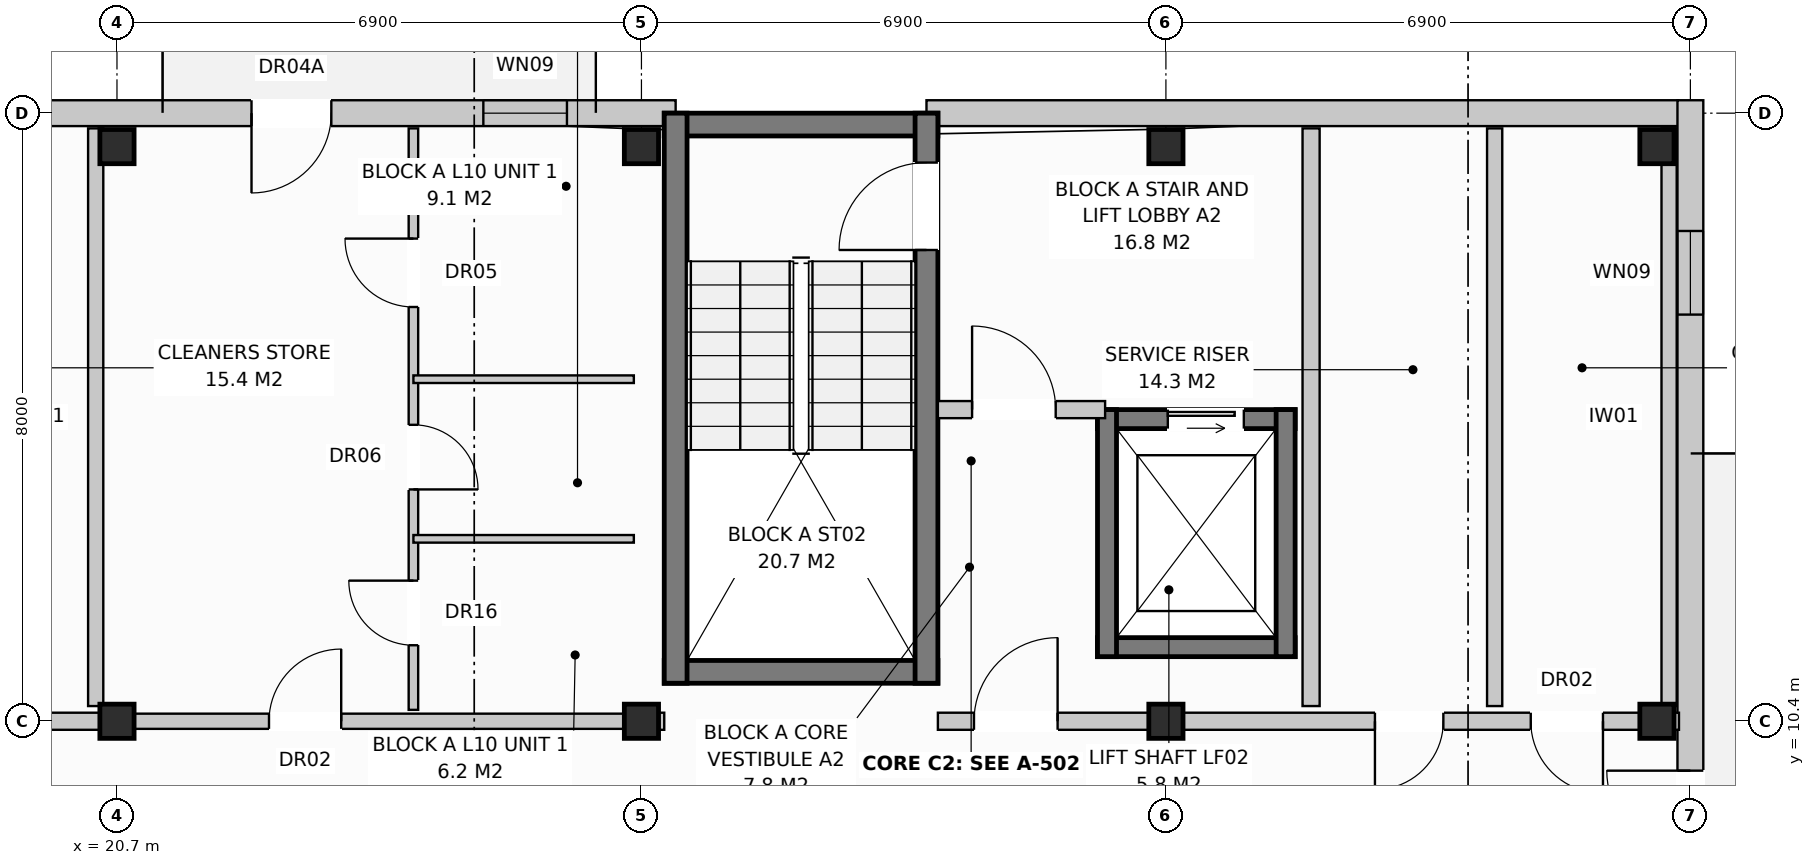
"""IFC4 building model, lengths in metres.
Left out: names, types, materials, properties, quantities, classifications, styles, units other than length and angle.
Written with IfcOpenShell. Run it as: python <this file> out.ifc"""

import sys

from ifc_helpers import new_model, si_unit, direction, frame, frame_2d, origin, origin_with_axes, origin_2d, place, context, subcontext, project, spatial, rectangle, extrude, element, fill, save


model = new_model("IFC4")
c1 = context("Model", 3, precision=1e-05, world=origin(), true_north=direction((0.0, 1.0)))
c2 = subcontext(c1, "Body", "Model", "MODEL_VIEW")
j1 = project(units=[si_unit("LENGTHUNIT", "METRE"), si_unit("PLANEANGLEUNIT", "RADIAN")], contexts=[c1])
p1 = place(None, origin())
s1 = spatial("IfcSite", under=j1, at=p1, CompositionType="ELEMENT")
p2 = place(p1, origin())
s2 = spatial("IfcBuilding", under=s1, at=p2, CompositionType="ELEMENT")
p3 = place(p2, frame((0.0, 0.0, 33.6)))
s3 = spatial("IfcBuildingStorey", under=s2, at=p3, CompositionType="ELEMENT", Elevation=33.6)
for number, where, z_axis, x_axis in (
    (1, (20.7, 10.4, 0.0), (0.0, 0.0, 1.0), (1.0, 0.0, 0.0)),
    (2, (20.7, 17.96, 0.0), (0.0, 0.0, 1.0), (1.0, 0.0, 0.0)),
    (3, (27.6, 10.4, 0.0), (0.0, 0.0, 1.0), (1.0, 0.0, 0.0)),
    (4, (27.6, 17.96, 0.0), (0.0, 0.0, 1.0), (1.0, 0.0, 0.0)),
    (5, (34.5, 10.4, 0.0), (0.0, 0.0, 1.0), (1.0, 0.0, 0.0)),
    (6, (34.5, 17.96, 0.0), (0.0, 0.0, 1.0), (1.0, 0.0, 0.0)),
    (7, (40.96, 10.4, 0.0), (0.0, 0.0, 1.0), (1.0, 0.0, 0.0)),
    (8, (40.96, 17.96, 0.0), (0.0, 0.0, 1.0), (1.0, 0.0, 0.0)),
):
    element("IfcColumn", number, at=place(p3, frame(where, z_axis=z_axis, x_axis=x_axis)), inside=s3, PredefinedType="COLUMN", context=c2, shape_type="SweptSolid", body=[
        extrude(rectangle(XDim=0.45, YDim=0.45, at=origin_2d()), origin(), (0.0, 0.0, 1.0), 3.2),
    ])
p4 = place(p3, frame((10.65, 18.4, 0.0), z_axis=(0.0, 0.0, 1.0), x_axis=(1.0, 0.0, 0.0)))
e9 = element("IfcWall", 9, at=p4, inside=s3, PredefinedType="STANDARD", context=c2, shape_type="SweptSolid", body=[
    extrude(rectangle(XDim=17.4, YDim=0.34, at=frame_2d((8.7, 0.0))), origin(), (0.0, 0.0, 1.0), 2.96),
])
p5 = place(p4, frame((11.82, 0.0, 0.0)))
e10 = element("IfcOpeningElement", 10, at=p5, cuts=e9, PredefinedType="OPENING", context=c2, shape_type="SweptSolid", body=[
    extrude(rectangle(XDim=1.05, YDim=2.12, at=frame_2d((0.525, 1.06))), frame((0.0, 0.182, 0.0), z_axis=(0.0, -1.0, 0.0), x_axis=(1.0, 0.0, 0.0)), (0.0, 0.0, 1.0), 0.364),
])
p6 = place(p4, frame((14.87, 0.0, 0.72)))
e11 = element("IfcOpeningElement", 11, at=p6, cuts=e9, PredefinedType="OPENING", context=c2, shape_type="SweptSolid", body=[
    extrude(rectangle(XDim=1.1, YDim=1.5, at=frame_2d((0.55, 0.75))), frame((0.0, 0.182, 0.0), z_axis=(0.0, -1.0, 0.0), x_axis=(1.0, 0.0, 0.0)), (0.0, 0.0, 1.0), 0.364),
])
p7 = place(p3, frame((31.35, 18.4, 0.0), z_axis=(0.0, 0.0, 1.0), x_axis=(1.0, 0.0, 0.0)))
e12 = element("IfcWall", 12, at=p7, inside=s3, PredefinedType="STANDARD", context=c2, shape_type="SweptSolid", body=[
    extrude(rectangle(XDim=9.89, YDim=0.34, at=frame_2d((4.945, 0.0))), origin(), (0.0, 0.0, 1.0), 2.96),
])
p8 = place(p3, frame((41.4, -0.17, 0.0), z_axis=(0.0, 0.0, 1.0), x_axis=(0.0, 1.0, 0.0)))
e13 = element("IfcWall", 13, at=p8, inside=s3, PredefinedType="STANDARD", context=c2, shape_type="SweptSolid", body=[
    extrude(rectangle(XDim=18.74, YDim=0.34, at=frame_2d((9.37, 0.0))), origin(), (0.0, 0.0, 1.0), 2.96),
])
p9 = place(p8, frame((8.82, 0.0, 0.0)))
e14 = element("IfcOpeningElement", 14, at=p9, cuts=e13, PredefinedType="OPENING", context=c2, shape_type="SweptSolid", body=[
    extrude(rectangle(XDim=1.1, YDim=2.1, at=frame_2d((0.55, 1.05))), frame((0.0, 0.182, 0.0), z_axis=(0.0, -1.0, 0.0), x_axis=(1.0, 0.0, 0.0)), (0.0, 0.0, 1.0), 0.364),
])
p10 = place(p8, frame((1.72, 0.0, 0.72)))
e15 = element("IfcOpeningElement", 15, at=p10, cuts=e13, PredefinedType="OPENING", context=c2, shape_type="SweptSolid", body=[
    extrude(rectangle(XDim=1.1, YDim=1.5, at=frame_2d((0.55, 0.75))), frame((0.0, 0.182, 0.0), z_axis=(0.0, -1.0, 0.0), x_axis=(1.0, 0.0, 0.0)), (0.0, 0.0, 1.0), 0.364),
])
p11 = place(p8, frame((15.92, 0.0, 0.72)))
e16 = element("IfcOpeningElement", 16, at=p11, cuts=e13, PredefinedType="OPENING", context=c2, shape_type="SweptSolid", body=[
    extrude(rectangle(XDim=1.1, YDim=1.5, at=frame_2d((0.55, 0.75))), frame((0.0, 0.182, 0.0), z_axis=(0.0, -1.0, 0.0), x_axis=(1.0, 0.0, 0.0)), (0.0, 0.0, 1.0), 0.364),
])
p12 = place(p3, frame((20.42, 10.6, 0.0), z_axis=(0.0, 0.0, 1.0), x_axis=(0.0, 1.0, 0.0)))
e17 = element("IfcWall", 17, at=p12, inside=s3, PredefinedType="PARTITIONING", context=c2, shape_type="SweptSolid", body=[
    extrude(rectangle(XDim=7.6, YDim=0.2, at=frame_2d((3.8, 0.0))), origin(), (0.0, 0.0, 1.0), 2.96),
])
p13 = place(p3, frame((10.8, 10.4, 0.0), z_axis=(0.0, 0.0, 1.0), x_axis=(1.0, 0.0, 0.0)))
e18 = element("IfcWall", 18, at=p13, inside=s3, PredefinedType="PARTITIONING", context=c2, shape_type="SweptSolid", body=[
    extrude(rectangle(XDim=9.9, YDim=0.225, at=frame_2d((4.95, 0.0))), origin(), (0.0, 0.0, 1.0), 2.4),
])
p14 = place(p13, frame((0.475, 0.0, 0.0)))
e19 = element("IfcOpeningElement", 19, at=p14, cuts=e18, PredefinedType="OPENING", context=c2, shape_type="SweptSolid", body=[
    extrude(rectangle(XDim=1.1, YDim=2.15, at=frame_2d((0.55, 1.075))), frame((0.0, 0.125, 0.0), z_axis=(0.0, -1.0, 0.0), x_axis=(1.0, 0.0, 0.0)), (0.0, 0.0, 1.0), 0.249),
])
p15 = place(p13, frame((5.75, 0.0, 0.0)))
e20 = element("IfcOpeningElement", 20, at=p15, cuts=e18, PredefinedType="OPENING", context=c2, shape_type="SweptSolid", body=[
    extrude(rectangle(XDim=0.9, YDim=2.1, at=frame_2d((0.45, 1.05))), frame((0.0, 0.125, 0.0), z_axis=(0.0, -1.0, 0.0), x_axis=(1.0, 0.0, 0.0)), (0.0, 0.0, 1.0), 0.249),
])
p16 = place(p13, frame((7.8, 0.0, 0.0)))
e21 = element("IfcOpeningElement", 21, at=p16, cuts=e18, PredefinedType="OPENING", context=c2, shape_type="SweptSolid", body=[
    extrude(rectangle(XDim=0.95, YDim=2.15, at=frame_2d((0.475, 1.075))), frame((0.0, 0.125, 0.0), z_axis=(0.0, -1.0, 0.0), x_axis=(1.0, 0.0, 0.0)), (0.0, 0.0, 1.0), 0.249),
])
for number, where, z_axis, x_axis in (
    (22, (27.9, 18.25, 0.0), (0.0, 0.0, 1.0), (1.0, 0.0, 0.0)),
    (23, (27.9, 11.05, 0.0), (0.0, 0.0, 1.0), (1.0, 0.0, 0.0)),
):
    element("IfcWall", number, at=place(p3, frame(where, z_axis=z_axis, x_axis=x_axis)), inside=s3, PredefinedType="SHEAR", context=c2, shape_type="SweptSolid", body=[
        extrude(rectangle(XDim=3.6, YDim=0.3, at=frame_2d((1.8, 0.0))), origin(), (0.0, 0.0, 1.0), 2.96),
    ])
p17 = place(p3, frame((28.05, 10.9, 0.0), z_axis=(0.0, 0.0, 1.0), x_axis=(0.0, 1.0, 0.0)))
e24 = element("IfcWall", 24, at=p17, inside=s3, PredefinedType="SHEAR", context=c2, shape_type="SweptSolid", body=[
    extrude(rectangle(XDim=7.5, YDim=0.3, at=frame_2d((3.75, 0.0))), origin(), (0.0, 0.0, 1.0), 2.96),
])
p18 = place(p3, frame((31.35, 10.9, 0.0), z_axis=(0.0, 0.0, 1.0), x_axis=(0.0, 1.0, 0.0)))
e25 = element("IfcWall", 25, at=p18, inside=s3, PredefinedType="SHEAR", context=c2, shape_type="SweptSolid", body=[
    extrude(rectangle(XDim=7.5, YDim=0.3, at=frame_2d((3.75, 0.0))), origin(), (0.0, 0.0, 1.0), 2.96),
])
p19 = place(p18, frame((5.7, 0.0, 0.0)))
e26 = element("IfcOpeningElement", 26, at=p19, cuts=e25, PredefinedType="OPENING", context=c2, shape_type="SweptSolid", body=[
    extrude(rectangle(XDim=1.15, YDim=2.15, at=frame_2d((0.575, 1.075))), frame((0.0, 0.162, 0.0), z_axis=(0.0, -1.0, 0.0), x_axis=(1.0, 0.0, 0.0)), (0.0, 0.0, 1.0), 0.324),
])
p20 = place(p3, frame((33.6, 14.375, 0.0), z_axis=(0.0, 0.0, 1.0), x_axis=(1.0, 0.0, 0.0)))
e27 = element("IfcWall", 27, at=p20, inside=s3, PredefinedType="SHEAR", context=c2, shape_type="SweptSolid", body=[
    extrude(rectangle(XDim=2.6, YDim=0.25, at=frame_2d((1.3, 0.0))), origin(), (0.0, 0.0, 1.0), 2.96),
])
p21 = place(p20, frame((0.925, 0.0, 0.0)))
e28 = element("IfcOpeningElement", 28, at=p21, cuts=e27, PredefinedType="OPENING", context=c2, shape_type="SweptSolid", body=[
    extrude(rectangle(XDim=1.0, YDim=2.1, at=frame_2d((0.5, 1.05))), frame((0.0, 0.137, 0.0), z_axis=(0.0, -1.0, 0.0), x_axis=(1.0, 0.0, 0.0)), (0.0, 0.0, 1.0), 0.274),
])
p22 = place(p3, frame((33.6, 11.375, 0.0), z_axis=(0.0, 0.0, 1.0), x_axis=(1.0, 0.0, 0.0)))
e29 = element("IfcWall", 29, at=p22, inside=s3, PredefinedType="SHEAR", context=c2, shape_type="SweptSolid", body=[
    extrude(rectangle(XDim=2.6, YDim=0.25, at=frame_2d((1.3, 0.0))), origin(), (0.0, 0.0, 1.0), 2.96),
])
for number, where, z_axis, x_axis in (
    (30, (33.725, 11.25, 0.0), (0.0, 0.0, 1.0), (0.0, 1.0, 0.0)),
    (31, (36.075, 11.25, 0.0), (0.0, 0.0, 1.0), (0.0, 1.0, 0.0)),
):
    element("IfcWall", number, at=place(p3, frame(where, z_axis=z_axis, x_axis=x_axis)), inside=s3, PredefinedType="SHEAR", context=c2, shape_type="SweptSolid", body=[
        extrude(rectangle(XDim=3.25, YDim=0.25, at=frame_2d((1.625, 0.0))), origin(), (0.0, 0.0, 1.0), 2.96),
    ])
p23 = place(p3, frame((36.41, 10.6, 0.0), z_axis=(0.0, 0.0, 1.0), x_axis=(0.0, 1.0, 0.0)))
e32 = element("IfcWall", 32, at=p23, inside=s3, PredefinedType="PARTITIONING", context=c2, shape_type="SweptSolid", body=[
    extrude(rectangle(XDim=7.6, YDim=0.225, at=frame_2d((3.8, 0.0))), origin(), (0.0, 0.0, 1.0), 2.59),
])
p24 = place(p3, frame((31.5, 14.5, 0.0), z_axis=(0.0, 0.0, 1.0), x_axis=(1.0, 0.0, 0.0)))
e33 = element("IfcWall", 33, at=p24, inside=s3, PredefinedType="PARTITIONING", context=c2, shape_type="SweptSolid", body=[
    extrude(rectangle(XDim=2.2, YDim=0.225, at=frame_2d((1.1, 0.0))), origin(), (0.0, 0.0, 1.0), 2.96),
])
p25 = place(p24, frame((0.45, 0.0, 0.0)))
e34 = element("IfcOpeningElement", 34, at=p25, cuts=e33, PredefinedType="OPENING", context=c2, shape_type="SweptSolid", body=[
    extrude(rectangle(XDim=1.1, YDim=2.15, at=frame_2d((0.55, 1.075))), frame((0.0, 0.125, 0.0), z_axis=(0.0, -1.0, 0.0), x_axis=(1.0, 0.0, 0.0)), (0.0, 0.0, 1.0), 0.249),
])
p26 = place(p3, frame((27.6, 10.4, 0.0), z_axis=(0.0, 0.0, 1.0), x_axis=(1.0, 0.0, 0.0)))
e35 = element("IfcWall", 35, at=p26, inside=s3, PredefinedType="PARTITIONING", context=c2, shape_type="SweptSolid", body=[
    extrude(rectangle(XDim=0.3, YDim=0.225, at=frame_2d((0.15, 0.0))), origin(), (0.0, 0.0, 1.0), 2.96),
])
p27 = place(p3, frame((38.825, 10.6, 0.0), z_axis=(0.0, 0.0, 1.0), x_axis=(0.0, 1.0, 0.0)))
e36 = element("IfcWall", 36, at=p27, inside=s3, PredefinedType="PARTITIONING", context=c2, shape_type="SweptSolid", body=[
    extrude(rectangle(XDim=7.6, YDim=0.2, at=frame_2d((3.8, 0.0))), origin(), (0.0, 0.0, 1.0), 2.96),
])
p28 = place(p3, frame((41.12, 10.6, 0.0), z_axis=(0.0, 0.0, 1.0), x_axis=(0.0, 1.0, 0.0)))
e37 = element("IfcWall", 37, at=p28, inside=s3, PredefinedType="PARTITIONING", context=c2, shape_type="SweptSolid", body=[
    extrude(rectangle(XDim=7.6, YDim=0.2, at=frame_2d((3.8, 0.0))), origin(), (0.0, 0.0, 1.0), 2.4),
])
p29 = place(p3, frame((31.5, 10.4, 0.0), z_axis=(0.0, 0.0, 1.0), x_axis=(1.0, 0.0, 0.0)))
e38 = element("IfcWall", 38, at=p29, inside=s3, PredefinedType="PARTITIONING", context=c2, shape_type="SweptSolid", body=[
    extrude(rectangle(XDim=9.75, YDim=0.225, at=frame_2d((4.875, 0.0))), origin(), (0.0, 0.0, 1.0), 2.4),
])
p30 = place(p29, frame((0.475, 0.0, 0.0)))
e39 = element("IfcOpeningElement", 39, at=p30, cuts=e38, PredefinedType="OPENING", context=c2, shape_type="SweptSolid", body=[
    extrude(rectangle(XDim=1.1, YDim=2.15, at=frame_2d((0.55, 1.075))), frame((0.0, 0.125, 0.0), z_axis=(0.0, -1.0, 0.0), x_axis=(1.0, 0.0, 0.0)), (0.0, 0.0, 1.0), 0.249),
])
p31 = place(p29, frame((5.75, 0.0, 0.0)))
e40 = element("IfcOpeningElement", 40, at=p31, cuts=e38, PredefinedType="OPENING", context=c2, shape_type="SweptSolid", body=[
    extrude(rectangle(XDim=0.9, YDim=2.1, at=frame_2d((0.45, 1.05))), frame((0.0, 0.125, 0.0), z_axis=(0.0, -1.0, 0.0), x_axis=(1.0, 0.0, 0.0)), (0.0, 0.0, 1.0), 0.249),
])
p32 = place(p29, frame((7.8, 0.0, 0.0)))
e41 = element("IfcOpeningElement", 41, at=p32, cuts=e38, PredefinedType="OPENING", context=c2, shape_type="SweptSolid", body=[
    extrude(rectangle(XDim=0.95, YDim=2.15, at=frame_2d((0.475, 1.075))), frame((0.0, 0.125, 0.0), z_axis=(0.0, -1.0, 0.0), x_axis=(1.0, 0.0, 0.0)), (0.0, 0.0, 1.0), 0.249),
])
p33 = place(p3, frame((20.7, 10.4, 0.0), z_axis=(0.0, 0.0, 1.0), x_axis=(1.0, 0.0, 0.0)))
e42 = element("IfcWall", 42, at=p33, inside=s3, PredefinedType="PARTITIONING", context=c2, shape_type="SweptSolid", body=[
    extrude(rectangle(XDim=6.9, YDim=0.2, at=frame_2d((3.45, 0.0))), origin(), (0.0, 0.0, 1.0), 2.4),
])
p34 = place(p33, frame((2.0, 0.0, 0.0)))
e43 = element("IfcOpeningElement", 43, at=p34, cuts=e42, PredefinedType="OPENING", context=c2, shape_type="SweptSolid", body=[
    extrude(rectangle(XDim=0.95, YDim=2.15, at=frame_2d((0.475, 1.075))), frame((0.0, 0.112, 0.0), z_axis=(0.0, -1.0, 0.0), x_axis=(1.0, 0.0, 0.0)), (0.0, 0.0, 1.0), 0.224),
])
p35 = place(p3, frame((24.6, 10.55, 0.0), z_axis=(0.0, 0.0, 1.0), x_axis=(0.0, 1.0, 0.0)))
e44 = element("IfcWall", 44, at=p35, inside=s3, PredefinedType="PARTITIONING", context=c2, shape_type="SweptSolid", body=[
    extrude(rectangle(XDim=7.65, YDim=0.125, at=frame_2d((3.825, 0.0))), origin(), (0.0, 0.0, 1.0), 2.96),
])
p36 = place(p35, frame((0.85, 0.0, 0.0)))
e45 = element("IfcOpeningElement", 45, at=p36, cuts=e44, PredefinedType="OPENING", context=c2, shape_type="SweptSolid", body=[
    extrude(rectangle(XDim=0.85, YDim=2.1, at=frame_2d((0.425, 1.05))), frame((0.0, 0.074, 0.0), z_axis=(0.0, -1.0, 0.0), x_axis=(1.0, 0.0, 0.0)), (0.0, 0.0, 1.0), 0.149),
])
p37 = place(p35, frame((2.9, 0.0, 0.0)))
e46 = element("IfcOpeningElement", 46, at=p37, cuts=e44, PredefinedType="OPENING", context=c2, shape_type="SweptSolid", body=[
    extrude(rectangle(XDim=0.85, YDim=2.05, at=frame_2d((0.425, 1.025))), frame((0.0, 0.074, 0.0), z_axis=(0.0, -1.0, 0.0), x_axis=(1.0, 0.0, 0.0)), (0.0, 0.0, 1.0), 0.149),
])
p38 = place(p35, frame((5.3, 0.0, 0.0)))
e47 = element("IfcOpeningElement", 47, at=p38, cuts=e44, PredefinedType="OPENING", context=c2, shape_type="SweptSolid", body=[
    extrude(rectangle(XDim=0.9, YDim=2.1, at=frame_2d((0.45, 1.05))), frame((0.0, 0.074, 0.0), z_axis=(0.0, -1.0, 0.0), x_axis=(1.0, 0.0, 0.0)), (0.0, 0.0, 1.0), 0.149),
])
for number, where, z_axis, x_axis in (
    (48, (24.6, 12.8, 0.0), (0.0, 0.0, 1.0), (1.0, 0.0, 0.0)),
    (49, (24.6, 14.9, 0.0), (0.0, 0.0, 1.0), (1.0, 0.0, 0.0)),
):
    element("IfcWall", number, at=place(p3, frame(where, z_axis=z_axis, x_axis=x_axis)), inside=s3, PredefinedType="PARTITIONING", context=c2, shape_type="SweptSolid", body=[
        extrude(rectangle(XDim=2.9, YDim=0.1, at=frame_2d((1.45, 0.0))), origin(), (0.0, 0.0, 1.0), 2.96),
    ])
p39 = place(p5, frame((1.05, 0.0, 0.0), z_axis=(0.0, 0.0, 1.0), x_axis=(-1.0, 0.0, 0.0)))
e50 = element("IfcDoor", 50, at=p39, inside=s3, OperationType="SINGLE_SWING_LEFT", PredefinedType="DOOR", context=c2, shape_type="SweptSolid", body=[
    extrude(rectangle(XDim=1.05, YDim=2.12, at=frame_2d((0.525, 1.06))), frame((0.0, 0.025, 0.0), z_axis=(0.0, -1.0, 0.0), x_axis=(1.0, 0.0, 0.0)), (0.0, 0.0, 1.0), 0.05),
])
fill(e10, e50)
p40 = place(p6, origin_with_axes())
e51 = element("IfcWindow", 51, at=p40, inside=s3, PartitioningType="SINGLE_PANEL", PredefinedType="WINDOW", context=c2, shape_type="SweptSolid", body=[
    extrude(rectangle(XDim=1.1, YDim=1.5, at=frame_2d((0.55, 0.75))), frame((0.0, 0.03, 0.0), z_axis=(0.0, -1.0, 0.0), x_axis=(1.0, 0.0, 0.0)), (0.0, 0.0, 1.0), 0.06),
])
fill(e11, e51)
p41 = place(p9, origin_with_axes())
e52 = element("IfcDoor", 52, at=p41, inside=s3, OperationType="SINGLE_SWING_RIGHT", PredefinedType="DOOR", context=c2, shape_type="SweptSolid", body=[
    extrude(rectangle(XDim=1.1, YDim=2.1, at=frame_2d((0.55, 1.05))), frame((0.0, 0.025, 0.0), z_axis=(0.0, -1.0, 0.0), x_axis=(1.0, 0.0, 0.0)), (0.0, 0.0, 1.0), 0.05),
])
fill(e14, e52)
p42 = place(p11, origin_with_axes())
e53 = element("IfcWindow", 53, at=p42, inside=s3, PartitioningType="SINGLE_PANEL", PredefinedType="WINDOW", context=c2, shape_type="SweptSolid", body=[
    extrude(rectangle(XDim=1.1, YDim=1.5, at=frame_2d((0.55, 0.75))), frame((0.0, 0.03, 0.0), z_axis=(0.0, -1.0, 0.0), x_axis=(1.0, 0.0, 0.0)), (0.0, 0.0, 1.0), 0.06),
])
fill(e16, e53)
p43 = place(p19, origin_with_axes())
e54 = element("IfcDoor", 54, at=p43, inside=s3, OperationType="SINGLE_SWING_LEFT", PredefinedType="DOOR", context=c2, shape_type="SweptSolid", body=[
    extrude(rectangle(XDim=1.15, YDim=2.15, at=frame_2d((0.575, 1.075))), frame((0.0, 0.025, 0.0), z_axis=(0.0, -1.0, 0.0), x_axis=(1.0, 0.0, 0.0)), (0.0, 0.0, 1.0), 0.05),
])
fill(e26, e54)
p44 = place(p21, origin_with_axes())
e55 = element("IfcDoor", 55, at=p44, inside=s3, OperationType="SLIDING_TO_LEFT", PredefinedType="DOOR", context=c2, shape_type="SweptSolid", body=[
    extrude(rectangle(XDim=1.0, YDim=2.1, at=frame_2d((0.5, 1.05))), frame((0.0, 0.025, 0.0), z_axis=(0.0, -1.0, 0.0), x_axis=(1.0, 0.0, 0.0)), (0.0, 0.0, 1.0), 0.05),
])
fill(e28, e55)
p45 = place(p25, origin_with_axes())
e56 = element("IfcDoor", 56, at=p45, inside=s3, OperationType="SINGLE_SWING_LEFT", PredefinedType="DOOR", context=c2, shape_type="SweptSolid", body=[
    extrude(rectangle(XDim=1.1, YDim=2.15, at=frame_2d((0.55, 1.075))), frame((0.0, 0.025, 0.0), z_axis=(0.0, -1.0, 0.0), x_axis=(1.0, 0.0, 0.0)), (0.0, 0.0, 1.0), 0.05),
])
fill(e34, e56)
p46 = place(p30, origin_with_axes())
e57 = element("IfcDoor", 57, at=p46, inside=s3, OperationType="SINGLE_SWING_RIGHT", PredefinedType="DOOR", context=c2, shape_type="SweptSolid", body=[
    extrude(rectangle(XDim=1.1, YDim=2.15, at=frame_2d((0.55, 1.075))), frame((0.0, 0.025, 0.0), z_axis=(0.0, -1.0, 0.0), x_axis=(1.0, 0.0, 0.0)), (0.0, 0.0, 1.0), 0.05),
])
fill(e39, e57)
p47 = place(p31, frame((0.9, 0.0, 0.0), z_axis=(0.0, 0.0, 1.0), x_axis=(-1.0, 0.0, 0.0)))
e58 = element("IfcDoor", 58, at=p47, inside=s3, OperationType="SINGLE_SWING_LEFT", PredefinedType="DOOR", context=c2, shape_type="SweptSolid", body=[
    extrude(rectangle(XDim=0.9, YDim=2.1, at=frame_2d((0.45, 1.05))), frame((0.0, 0.025, 0.0), z_axis=(0.0, -1.0, 0.0), x_axis=(1.0, 0.0, 0.0)), (0.0, 0.0, 1.0), 0.05),
])
fill(e40, e58)
p48 = place(p32, frame((0.95, 0.0, 0.0), z_axis=(0.0, 0.0, 1.0), x_axis=(-1.0, 0.0, 0.0)))
e59 = element("IfcDoor", 59, at=p48, inside=s3, OperationType="SINGLE_SWING_RIGHT", PredefinedType="DOOR", context=c2, shape_type="SweptSolid", body=[
    extrude(rectangle(XDim=0.95, YDim=2.15, at=frame_2d((0.475, 1.075))), frame((0.0, 0.025, 0.0), z_axis=(0.0, -1.0, 0.0), x_axis=(1.0, 0.0, 0.0)), (0.0, 0.0, 1.0), 0.05),
])
fill(e41, e59)
p49 = place(p34, origin_with_axes())
e60 = element("IfcDoor", 60, at=p49, inside=s3, OperationType="SINGLE_SWING_RIGHT", PredefinedType="DOOR", context=c2, shape_type="SweptSolid", body=[
    extrude(rectangle(XDim=0.95, YDim=2.15, at=frame_2d((0.475, 1.075))), frame((0.0, 0.025, 0.0), z_axis=(0.0, -1.0, 0.0), x_axis=(1.0, 0.0, 0.0)), (0.0, 0.0, 1.0), 0.05),
])
fill(e43, e60)
p50 = place(p36, origin_with_axes())
e61 = element("IfcDoor", 61, at=p50, inside=s3, OperationType="SINGLE_SWING_RIGHT", PredefinedType="DOOR", context=c2, shape_type="SweptSolid", body=[
    extrude(rectangle(XDim=0.85, YDim=2.1, at=frame_2d((0.425, 1.05))), frame((0.0, 0.025, 0.0), z_axis=(0.0, -1.0, 0.0), x_axis=(1.0, 0.0, 0.0)), (0.0, 0.0, 1.0), 0.05),
])
fill(e45, e61)
p51 = place(p37, frame((0.85, 0.0, 0.0), z_axis=(0.0, 0.0, 1.0), x_axis=(-1.0, 0.0, 0.0)))
e62 = element("IfcDoor", 62, at=p51, inside=s3, OperationType="SINGLE_SWING_LEFT", PredefinedType="DOOR", context=c2, shape_type="SweptSolid", body=[
    extrude(rectangle(XDim=0.85, YDim=2.05, at=frame_2d((0.425, 1.025))), frame((0.0, 0.025, 0.0), z_axis=(0.0, -1.0, 0.0), x_axis=(1.0, 0.0, 0.0)), (0.0, 0.0, 1.0), 0.05),
])
fill(e46, e62)
p52 = place(p38, origin_with_axes())
e63 = element("IfcDoor", 63, at=p52, inside=s3, OperationType="SINGLE_SWING_RIGHT", PredefinedType="DOOR", context=c2, shape_type="SweptSolid", body=[
    extrude(rectangle(XDim=0.9, YDim=2.1, at=frame_2d((0.45, 1.05))), frame((0.0, 0.025, 0.0), z_axis=(0.0, -1.0, 0.0), x_axis=(1.0, 0.0, 0.0)), (0.0, 0.0, 1.0), 0.05),
])
fill(e47, e63)
save(model, sys.argv[1])
